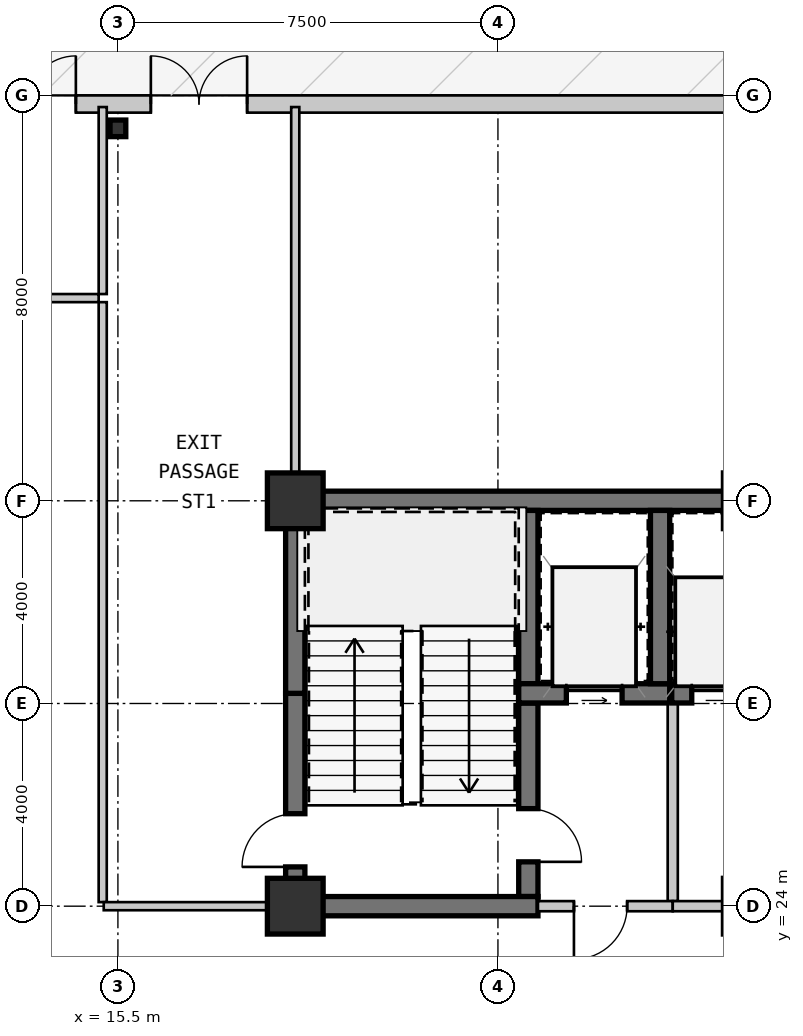
"""IFC4 building model, lengths in metres.
Left out: names, types, materials, properties, quantities, classifications, styles, units other than length and angle.
Written with IfcOpenShell. Run it as: python <this file> out.ifc"""

import sys

from ifc_helpers import new_model, si_unit, direction, frame, frame_2d, origin, origin_2d, place, context, subcontext, project, spatial, rectangle, i_section, extrude, source, transform, mapped, element, fill, save


model = new_model("IFC4")
c1 = context("Model", 3, precision=1e-05, world=origin(), true_north=direction((0.0, 1.0)))
c2 = subcontext(c1, "Body", "Model", "MODEL_VIEW")
j1 = project(units=[si_unit("LENGTHUNIT", "METRE"), si_unit("PLANEANGLEUNIT", "RADIAN")], contexts=[c1])
p1 = place(None, origin())
s1 = spatial("IfcSite", under=j1, at=p1, CompositionType="ELEMENT")
p2 = place(p1, origin())
s2 = spatial("IfcBuilding", under=s1, at=p2, CompositionType="ELEMENT")
p3 = place(p2, origin())
s3 = spatial("IfcBuildingStorey", under=s2, at=p3, CompositionType="ELEMENT", Elevation=0.0)
m1 = source(origin(), c2, "Body", "SweptSolid", [
    extrude(rectangle(XDim=1.1, YDim=1.1, at=origin_2d()), origin(), (0.0, 0.0, 1.0), 4.55),
])
for number, where, z_axis, x_axis in (
    (1, (19.0, 24.0, 0.0), (0.0, 0.0, 1.0), (1.0, 0.0, 0.0)),
    (2, (19.0, 32.0, 0.0), (0.0, 0.0, 1.0), (1.0, 0.0, 0.0)),
):
    element("IfcColumn", number, at=place(p3, frame(where, z_axis=z_axis, x_axis=x_axis)), inside=s3, PredefinedType="COLUMN", context=c2, shape_type="MappedRepresentation", body=[
        mapped(m1, transform((0.0, 0.0, 0.0), scale=1.0)),
    ])
m2 = source(origin(), c2, "Body", "SweptSolid", [
    extrude(i_section(OverallWidth=0.311, OverallDepth=0.327, WebThickness=0.016, FlangeThickness=0.025, at=origin_2d()), origin(), (0.0, 0.0, 1.0), 4.55),
])
p4 = place(p3, frame((15.5, 39.35, 0.0), z_axis=(0.0, 0.0, 1.0), x_axis=(1.0, 0.0, 0.0)))
e3 = element("IfcColumn", 3, at=p4, inside=s3, PredefinedType="COLUMN", context=c2, shape_type="MappedRepresentation", body=[
    mapped(m2, transform((0.0, 0.0, 0.0), scale=1.0)),
])
m3 = source(origin(), c2, "Body", "SweptSolid", [
    extrude(rectangle(XDim=69.66, YDim=0.34, at=frame_2d((34.83, 0.0))), origin(), (0.0, 0.0, 1.0), 4.29),
])
p5 = place(p3, frame((0.17, 39.83, 0.0), z_axis=(0.0, 0.0, 1.0), x_axis=(1.0, 0.0, 0.0)))
e4 = element("IfcWall", 4, at=p5, inside=s3, PredefinedType="SOLIDWALL", context=c2, shape_type="MappedRepresentation", body=[
    mapped(m3, transform((0.0, 0.0, 0.0), scale=1.0)),
])
m4 = source(origin(), c2, "Body", "SweptSolid", [
    extrude(rectangle(XDim=3.6, YDim=3.4, at=frame_2d((1.8, 1.7))), frame((0.0, 0.18, 0.0), z_axis=(0.0, -1.0, 0.0), x_axis=(1.0, 0.0, 0.0)), (0.0, 0.0, 1.0), 0.36),
])
p6 = place(p5, frame((2.2, 0.0, 0.0)))
e5 = element("IfcOpeningElement", 5, at=p6, cuts=e4, PredefinedType="OPENING", context=c2, shape_type="MappedRepresentation", body=[
    mapped(m4, transform((0.0, 0.0, 0.0), scale=1.0)),
])
m5 = source(origin(), c2, "Body", "SweptSolid", [
    extrude(rectangle(XDim=1.9, YDim=2.4, at=frame_2d((0.95, 1.2))), frame((0.0, 0.18, 0.0), z_axis=(0.0, -1.0, 0.0), x_axis=(1.0, 0.0, 0.0)), (0.0, 0.0, 1.0), 0.36),
])
p7 = place(p5, frame((12.6, 0.0, 0.0)))
e6 = element("IfcOpeningElement", 6, at=p7, cuts=e4, PredefinedType="OPENING", context=c2, shape_type="MappedRepresentation", body=[
    mapped(m5, transform((0.0, 0.0, 0.0), scale=1.0)),
])
p8 = place(p5, frame((15.98, 0.0, 0.0)))
e7 = element("IfcOpeningElement", 7, at=p8, cuts=e4, PredefinedType="OPENING", context=c2, shape_type="MappedRepresentation", body=[
    mapped(m5, transform((0.0, 0.0, 0.0), scale=1.0)),
])
p9 = place(p5, frame((46.5, 0.0, 0.0)))
e8 = element("IfcOpeningElement", 8, at=p9, cuts=e4, PredefinedType="OPENING", context=c2, shape_type="MappedRepresentation", body=[
    mapped(m5, transform((0.0, 0.0, 0.0), scale=1.0)),
])
p10 = place(p5, frame((63.0, 0.0, 0.0)))
e9 = element("IfcOpeningElement", 9, at=p10, cuts=e4, PredefinedType="OPENING", context=c2, shape_type="MappedRepresentation", body=[
    mapped(m4, transform((0.0, 0.0, 0.0), scale=1.0)),
])
m6 = source(origin(), c2, "Body", "SweptSolid", [
    extrude(rectangle(XDim=9.19, YDim=0.38, at=frame_2d((4.595, 0.0))), origin(), (0.0, 0.0, 1.0), 4.29),
])
p11 = place(p3, frame((18.81, 32.0, 0.0), z_axis=(0.0, 0.0, 1.0), x_axis=(1.0, 0.0, 0.0)))
e10 = element("IfcWall", 10, at=p11, inside=s3, PredefinedType="SHEAR", context=c2, shape_type="MappedRepresentation", body=[
    mapped(m6, transform((0.0, 0.0, 0.0), scale=1.0)),
])
m7 = source(origin(), c2, "Body", "SweptSolid", [
    extrude(rectangle(XDim=4.01, YDim=0.38, at=frame_2d((2.005, 0.0))), origin(), (0.0, 0.0, 1.0), 4.29),
])
p12 = place(p3, frame((19.0, 24.19, 0.0), z_axis=(0.0, 0.0, 1.0), x_axis=(0.0, 1.0, 0.0)))
e11 = element("IfcWall", 11, at=p12, inside=s3, PredefinedType="SHEAR", context=c2, shape_type="MappedRepresentation", body=[
    mapped(m7, transform((0.0, 0.0, 0.0), scale=1.0)),
])
m8 = source(origin(), c2, "Body", "SweptSolid", [
    extrude(rectangle(XDim=1.05, YDim=2.1, at=frame_2d((0.525, 1.05))), frame((0.0, 0.2, 0.0), z_axis=(0.0, -1.0, 0.0), x_axis=(1.0, 0.0, 0.0)), (0.0, 0.0, 1.0), 0.4),
])
p13 = place(p12, frame((0.585, 0.0, 0.0)))
e12 = element("IfcOpeningElement", 12, at=p13, cuts=e11, PredefinedType="OPENING", context=c2, shape_type="MappedRepresentation", body=[
    mapped(m8, transform((0.0, 0.0, 0.0), scale=1.0)),
])
m9 = source(origin(), c2, "Body", "SweptSolid", [
    extrude(rectangle(XDim=3.61, YDim=0.38, at=frame_2d((1.805, 0.0))), origin(), (0.0, 0.0, 1.0), 4.29),
])
p14 = place(p3, frame((19.0, 28.2, 0.0), z_axis=(0.0, 0.0, 1.0), x_axis=(0.0, 1.0, 0.0)))
e13 = element("IfcWall", 13, at=p14, inside=s3, PredefinedType="SHEAR", context=c2, shape_type="MappedRepresentation", body=[
    mapped(m9, transform((0.0, 0.0, 0.0), scale=1.0)),
])
m10 = source(origin(), c2, "Body", "SweptSolid", [
    extrude(rectangle(XDim=3.42, YDim=0.38, at=frame_2d((1.71, 0.0))), origin(), (0.0, 0.0, 1.0), 4.29),
])
p15 = place(p3, frame((23.6, 28.39, 0.0), z_axis=(0.0, 0.0, 1.0), x_axis=(0.0, 1.0, 0.0)))
e14 = element("IfcWall", 14, at=p15, inside=s3, PredefinedType="SHEAR", context=c2, shape_type="MappedRepresentation", body=[
    mapped(m10, transform((0.0, 0.0, 0.0), scale=1.0)),
])
m11 = source(origin(), c2, "Body", "SweptSolid", [
    extrude(rectangle(XDim=3.82, YDim=0.38, at=frame_2d((1.91, 0.0))), origin(), (0.0, 0.0, 1.0), 4.29),
])
p16 = place(p3, frame((23.6, 24.19, 0.0), z_axis=(0.0, 0.0, 1.0), x_axis=(0.0, 1.0, 0.0)))
e15 = element("IfcWall", 15, at=p16, inside=s3, PredefinedType="SHEAR", context=c2, shape_type="MappedRepresentation", body=[
    mapped(m11, transform((0.0, 0.0, 0.0), scale=1.0)),
])
p17 = place(p16, frame((0.685, 0.0, 0.0)))
e16 = element("IfcOpeningElement", 16, at=p17, cuts=e15, PredefinedType="OPENING", context=c2, shape_type="MappedRepresentation", body=[
    mapped(m8, transform((0.0, 0.0, 0.0), scale=1.0)),
])
m12 = source(origin(), c2, "Body", "SweptSolid", [
    extrude(rectangle(XDim=4.98, YDim=0.38, at=frame_2d((2.49, 0.0))), origin(), (0.0, 0.0, 1.0), 4.29),
])
p18 = place(p3, frame((18.81, 24.0, 0.0), z_axis=(0.0, 0.0, 1.0), x_axis=(1.0, 0.0, 0.0)))
e17 = element("IfcWall", 17, at=p18, inside=s3, PredefinedType="SHEAR", context=c2, shape_type="MappedRepresentation", body=[
    mapped(m12, transform((0.0, 0.0, 0.0), scale=1.0)),
])
m13 = source(origin(), c2, "Body", "SweptSolid", [
    extrude(rectangle(XDim=2.98, YDim=0.38, at=frame_2d((1.49, 0.0))), origin(), (0.0, 0.0, 1.0), 4.29),
])
p19 = place(p3, frame((23.41, 28.2, 0.0), z_axis=(0.0, 0.0, 1.0), x_axis=(1.0, 0.0, 0.0)))
e18 = element("IfcWall", 18, at=p19, inside=s3, PredefinedType="SHEAR", context=c2, shape_type="MappedRepresentation", body=[
    mapped(m13, transform((0.0, 0.0, 0.0), scale=1.0)),
])
m14 = source(origin(), c2, "Body", "SweptSolid", [
    extrude(rectangle(XDim=1.1, YDim=2.15, at=frame_2d((0.55, 1.075))), frame((0.0, 0.2, 0.0), z_axis=(0.0, -1.0, 0.0), x_axis=(1.0, 0.0, 0.0)), (0.0, 0.0, 1.0), 0.4),
])
p20 = place(p19, frame((0.94, 0.0, 0.0)))
e19 = element("IfcOpeningElement", 19, at=p20, cuts=e18, PredefinedType="OPENING", context=c2, shape_type="MappedRepresentation", body=[
    mapped(m14, transform((0.0, 0.0, 0.0), scale=1.0)),
])
p21 = place(p3, frame((26.2, 28.39, 0.0), z_axis=(0.0, 0.0, 1.0), x_axis=(0.0, 1.0, 0.0)))
e20 = element("IfcWall", 20, at=p21, inside=s3, PredefinedType="SHEAR", context=c2, shape_type="MappedRepresentation", body=[
    mapped(m10, transform((0.0, 0.0, 0.0), scale=1.0)),
])
m15 = source(origin(), c2, "Body", "SweptSolid", [
    extrude(rectangle(XDim=3.91, YDim=0.2, at=frame_2d((1.955, 0.0))), origin(), (0.0, 0.0, 1.0), 4.29),
])
p22 = place(p3, frame((26.45, 24.1, 0.0), z_axis=(0.0, 0.0, 1.0), x_axis=(0.0, 1.0, 0.0)))
e21 = element("IfcWall", 21, at=p22, inside=s3, PredefinedType="SOLIDWALL", context=c2, shape_type="MappedRepresentation", body=[
    mapped(m15, transform((0.0, 0.0, 0.0), scale=1.0)),
])
m16 = source(origin(), c2, "Body", "SweptSolid", [
    extrude(rectangle(XDim=2.66, YDim=0.2, at=frame_2d((1.33, 0.0))), origin(), (0.0, 0.0, 1.0), 3.83),
])
p23 = place(p3, frame((23.79, 24.0, 0.0), z_axis=(0.0, 0.0, 1.0), x_axis=(1.0, 0.0, 0.0)))
e22 = element("IfcWall", 22, at=p23, inside=s3, PredefinedType="SOLIDWALL", context=c2, shape_type="MappedRepresentation", body=[
    mapped(m16, transform((0.0, 0.0, 0.0), scale=1.0)),
])
m17 = source(origin(), c2, "Body", "SweptSolid", [
    extrude(rectangle(XDim=1.05, YDim=2.1, at=frame_2d((0.525, 1.05))), frame((0.0, 0.11, 0.0), z_axis=(0.0, -1.0, 0.0), x_axis=(1.0, 0.0, 0.0)), (0.0, 0.0, 1.0), 0.22),
])
p24 = place(p23, frame((0.71, 0.0, 0.0)))
e23 = element("IfcOpeningElement", 23, at=p24, cuts=e22, PredefinedType="OPENING", context=c2, shape_type="MappedRepresentation", body=[
    mapped(m17, transform((0.0, 0.0, 0.0), scale=1.0)),
])
m18 = source(origin(), c2, "Body", "SweptSolid", [
    extrude(rectangle(XDim=2.07, YDim=0.38, at=frame_2d((1.035, 0.0))), origin(), (0.0, 0.0, 1.0), 4.29),
])
p25 = place(p3, frame((26.43, 28.2, 0.0), z_axis=(0.0, 0.0, 1.0), x_axis=(1.0, 0.0, 0.0)))
e24 = element("IfcWall", 24, at=p25, inside=s3, PredefinedType="SHEAR", context=c2, shape_type="MappedRepresentation", body=[
    mapped(m18, transform((0.0, 0.0, 0.0), scale=1.0)),
])
m19 = source(origin(), c2, "Body", "SweptSolid", [
    extrude(rectangle(XDim=1.05, YDim=2.15, at=frame_2d((0.525, 1.075))), frame((0.0, 0.2, 0.0), z_axis=(0.0, -1.0, 0.0), x_axis=(1.0, 0.0, 0.0)), (0.0, 0.0, 1.0), 0.4),
])
p26 = place(p25, frame((0.395, 0.0, 0.0)))
e25 = element("IfcOpeningElement", 25, at=p26, cuts=e24, PredefinedType="OPENING", context=c2, shape_type="MappedRepresentation", body=[
    mapped(m19, transform((0.0, 0.0, 0.0), scale=1.0)),
])
m20 = source(origin(), c2, "Body", "SweptSolid", [
    extrude(rectangle(XDim=4.35, YDim=0.2, at=frame_2d((2.175, 0.0))), origin(), (0.0, 0.0, 1.0), 3.83),
])
p27 = place(p3, frame((30.8, 24.0, 0.0), z_axis=(0.0, 0.0, 1.0), x_axis=(-1.0, 0.0, 0.0)))
e26 = element("IfcWall", 26, at=p27, inside=s3, PredefinedType="SOLIDWALL", context=c2, shape_type="MappedRepresentation", body=[
    mapped(m20, transform((0.0, 0.0, 0.0), scale=1.0)),
])
p28 = place(p27, frame((0.75, 0.0, 0.0)))
e27 = element("IfcOpeningElement", 27, at=p28, cuts=e26, PredefinedType="OPENING", context=c2, shape_type="MappedRepresentation", body=[
    mapped(m17, transform((0.0, 0.0, 0.0), scale=1.0)),
])
m21 = source(origin(), c2, "Body", "SweptSolid", [
    extrude(rectangle(XDim=2.7, YDim=0.16, at=frame_2d((1.35, 0.0))), origin(), (0.0, 0.0, 1.0), 4.29),
])
p29 = place(p3, frame((12.42, 36.0, 0.0), z_axis=(0.0, 0.0, 1.0), x_axis=(1.0, 0.0, 0.0)))
e28 = element("IfcWall", 28, at=p29, inside=s3, PredefinedType="PARTITIONING", context=c2, shape_type="MappedRepresentation", body=[
    mapped(m21, transform((0.0, 0.0, 0.0), scale=1.0)),
])
m22 = source(origin(), c2, "Body", "SweptSolid", [
    extrude(rectangle(XDim=11.84, YDim=0.16, at=frame_2d((5.92, 0.0))), origin(), (0.0, 0.0, 1.0), 4.29),
])
p30 = place(p3, frame((15.2, 35.92, 0.0), z_axis=(0.0, 0.0, 1.0), x_axis=(0.0, -1.0, 0.0)))
e29 = element("IfcWall", 29, at=p30, inside=s3, PredefinedType="PARTITIONING", context=c2, shape_type="MappedRepresentation", body=[
    mapped(m22, transform((0.0, 0.0, 0.0), scale=1.0)),
])
m23 = source(origin(), c2, "Body", "SweptSolid", [
    extrude(rectangle(XDim=3.59, YDim=0.16, at=frame_2d((1.795, 0.0))), origin(), (0.0, 0.0, 1.0), 4.29),
])
p31 = place(p3, frame((15.22, 24.0, 0.0), z_axis=(0.0, 0.0, 1.0), x_axis=(1.0, 0.0, 0.0)))
e30 = element("IfcWall", 30, at=p31, inside=s3, PredefinedType="PARTITIONING", context=c2, shape_type="MappedRepresentation", body=[
    mapped(m23, transform((0.0, 0.0, 0.0), scale=1.0)),
])
m24 = source(origin(), c2, "Body", "SweptSolid", [
    extrude(rectangle(XDim=3.69, YDim=0.16, at=frame_2d((1.845, 0.0))), origin(), (0.0, 0.0, 1.0), 4.29),
])
p32 = place(p3, frame((15.2, 39.77, 0.0), z_axis=(0.0, 0.0, 1.0), x_axis=(0.0, -1.0, 0.0)))
e31 = element("IfcWall", 31, at=p32, inside=s3, PredefinedType="PARTITIONING", context=c2, shape_type="MappedRepresentation", body=[
    mapped(m24, transform((0.0, 0.0, 0.0), scale=1.0)),
])
m25 = source(origin(), c2, "Body", "SweptSolid", [
    extrude(rectangle(XDim=7.58, YDim=0.16, at=frame_2d((3.79, 0.0))), origin(), (0.0, 0.0, 1.0), 4.29),
])
p33 = place(p3, frame((19.0, 39.77, 0.0), z_axis=(0.0, 0.0, 1.0), x_axis=(0.0, -1.0, 0.0)))
e32 = element("IfcWall", 32, at=p33, inside=s3, PredefinedType="PARTITIONING", context=c2, shape_type="MappedRepresentation", body=[
    mapped(m25, transform((0.0, 0.0, 0.0), scale=1.0)),
])
m26 = source(origin(), c2, "Body", "SweptSolid", [
    extrude(rectangle(XDim=1.9, YDim=2.4, at=frame_2d((0.95, 1.2))), frame((0.0, 0.025, 0.0), z_axis=(0.0, -1.0, 0.0), x_axis=(1.0, 0.0, 0.0)), (0.0, 0.0, 1.0), 0.05),
])
p34 = place(p7, origin())
e33 = element("IfcDoor", 33, at=p34, inside=s3, OperationType="DOUBLE_DOOR_SINGLE_SWING", PredefinedType="DOOR", context=c2, shape_type="MappedRepresentation", body=[
    mapped(m26, transform((0.0, 0.0, 0.0), scale=1.0)),
])
fill(e6, e33)
p35 = place(p8, origin())
e34 = element("IfcDoor", 34, at=p35, inside=s3, OperationType="DOUBLE_DOOR_SINGLE_SWING", PredefinedType="DOOR", context=c2, shape_type="MappedRepresentation", body=[
    mapped(m26, transform((0.0, 0.0, 0.0), scale=1.0)),
])
fill(e7, e34)
m27 = source(origin(), c2, "Body", "SweptSolid", [
    extrude(rectangle(XDim=1.05, YDim=2.1, at=frame_2d((0.525, 1.05))), frame((0.0, 0.025, 0.0), z_axis=(0.0, -1.0, 0.0), x_axis=(1.0, 0.0, 0.0)), (0.0, 0.0, 1.0), 0.05),
])
p36 = place(p17, frame((1.05, 0.0, 0.0), z_axis=(0.0, 0.0, 1.0), x_axis=(-1.0, 0.0, 0.0)))
e35 = element("IfcDoor", 35, at=p36, inside=s3, OperationType="SINGLE_SWING_RIGHT", PredefinedType="DOOR", context=c2, shape_type="MappedRepresentation", body=[
    mapped(m27, transform((0.0, 0.0, 0.0), scale=1.0)),
])
fill(e16, e35)
m28 = source(origin(), c2, "Body", "SweptSolid", [
    extrude(rectangle(XDim=1.1, YDim=2.15, at=frame_2d((0.55, 1.075))), frame((0.0, 0.025, 0.0), z_axis=(0.0, -1.0, 0.0), x_axis=(1.0, 0.0, 0.0)), (0.0, 0.0, 1.0), 0.05),
])
p37 = place(p20, origin())
e36 = element("IfcDoor", 36, at=p37, inside=s3, OperationType="SLIDING_TO_LEFT", PredefinedType="DOOR", context=c2, shape_type="MappedRepresentation", body=[
    mapped(m28, transform((0.0, 0.0, 0.0), scale=1.0)),
])
fill(e19, e36)
p38 = place(p24, frame((1.05, 0.0, 0.0), z_axis=(0.0, 0.0, 1.0), x_axis=(-1.0, 0.0, 0.0)))
e37 = element("IfcDoor", 37, at=p38, inside=s3, OperationType="SINGLE_SWING_RIGHT", PredefinedType="DOOR", context=c2, shape_type="MappedRepresentation", body=[
    mapped(m27, transform((0.0, 0.0, 0.0), scale=1.0)),
])
fill(e23, e37)
m29 = source(origin(), c2, "Body", "SweptSolid", [
    extrude(rectangle(XDim=1.05, YDim=2.15, at=frame_2d((0.525, 1.075))), frame((0.0, 0.025, 0.0), z_axis=(0.0, -1.0, 0.0), x_axis=(1.0, 0.0, 0.0)), (0.0, 0.0, 1.0), 0.05),
])
p39 = place(p26, origin())
e38 = element("IfcDoor", 38, at=p39, inside=s3, OperationType="SLIDING_TO_LEFT", PredefinedType="DOOR", context=c2, shape_type="MappedRepresentation", body=[
    mapped(m29, transform((0.0, 0.0, 0.0), scale=1.0)),
])
fill(e25, e38)
p40 = place(p13, origin())
e39 = element("IfcDoor", 39, at=p40, inside=s3, OperationType="SINGLE_SWING_LEFT", PredefinedType="DOOR", context=c2, shape_type="MappedRepresentation", body=[
    mapped(m27, transform((0.0, 0.0, 0.0), scale=1.0)),
])
fill(e12, e39)
save(model, sys.argv[1])
